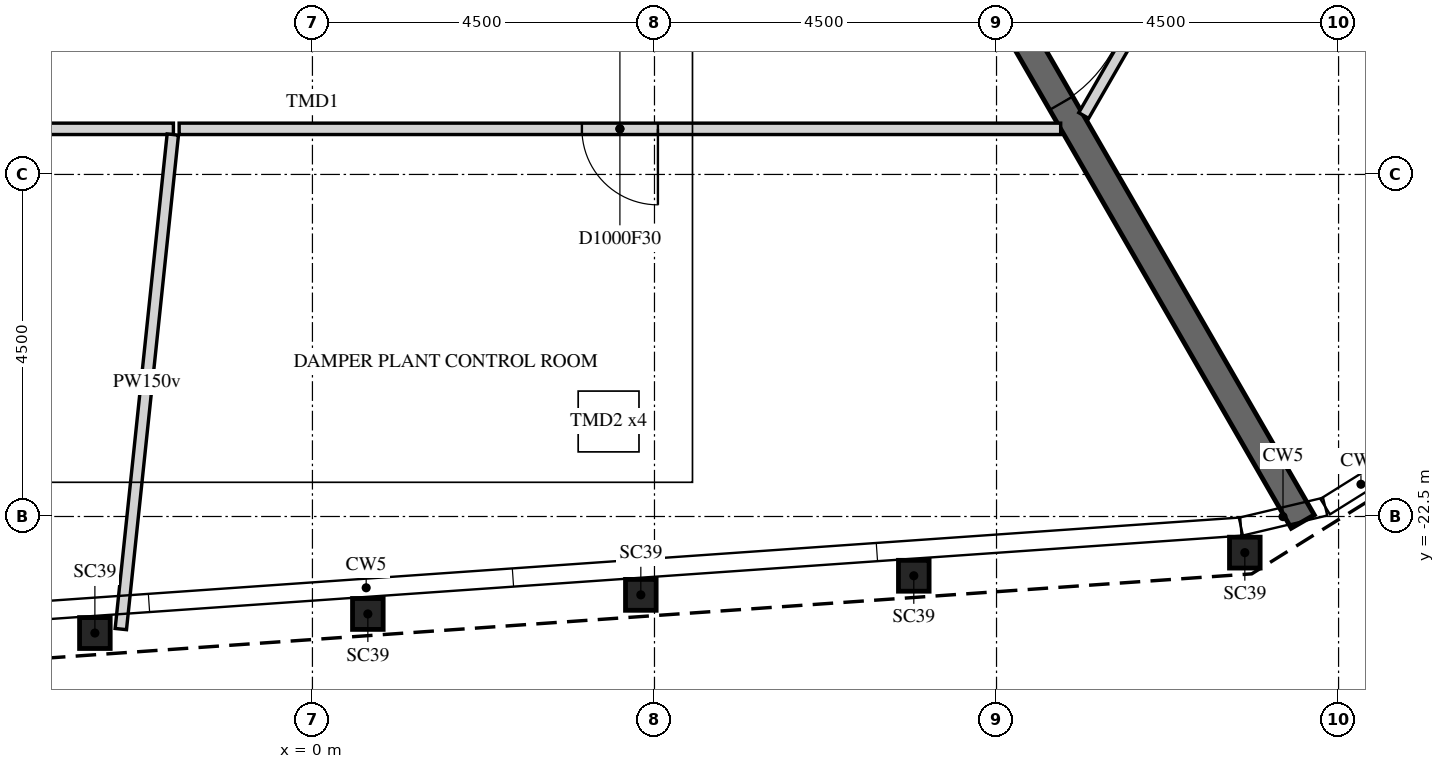
"""IFC4 building model, lengths in metres.
Left out: names, types, materials, properties, quantities, classifications, styles, units other than length and angle.
Written with IfcOpenShell. Run it as: python <this file> out.ifc"""

import sys

from ifc_helpers import new_model, si_unit, direction, frame, frame_2d, origin, origin_2d, place, context, subcontext, project, spatial, rectangle, i_section, extrude, element, fill, save


model = new_model("IFC4")
c1 = context("Model", 3, precision=1e-05, world=origin(), true_north=direction((0.0, 1.0)))
c2 = subcontext(c1, "Body", "Model", "MODEL_VIEW")
j1 = project(units=[si_unit("LENGTHUNIT", "METRE"), si_unit("PLANEANGLEUNIT", "RADIAN")], contexts=[c1])
p1 = place(None, origin())
s1 = spatial("IfcSite", under=j1, at=p1, CompositionType="ELEMENT")
p2 = place(p1, origin())
s2 = spatial("IfcBuilding", under=s1, at=p2, CompositionType="ELEMENT")
p3 = place(p2, frame((0.0, 0.0, 376.8)))
s3 = spatial("IfcBuildingStorey", under=s2, at=p3, CompositionType="ELEMENT", Elevation=376.8)
for number, where, z_axis, x_axis in (
    (1, (-2.862, -24.033, 0.0), (0.0, 0.0, 1.0), (1.0, 0.0, 0.0)),
    (2, (0.729, -23.782, 0.0), (0.0, 0.0, 1.0), (1.0, 0.0, 0.0)),
    (3, (4.32, -23.531, 0.0), (0.0, 0.0, 1.0), (1.0, 0.0, 0.0)),
    (4, (7.912, -23.28, 0.0), (0.0, 0.0, 1.0), (1.0, 0.0, 0.0)),
    (5, (12.267, -22.975, 0.0), (0.0, 0.0, 1.0), (1.0, 0.0, 0.0)),
):
    element("IfcColumn", number, at=place(p3, frame(where, z_axis=z_axis, x_axis=x_axis)), inside=s3, PredefinedType="COLUMN", context=c2, shape_type="SweptSolid", body=[
        extrude(i_section(OverallWidth=0.403, OverallDepth=0.406, WebThickness=0.027, FlangeThickness=0.043, FilletRadius=0.015, at=origin_2d()), origin(), (0.0, 0.0, 1.0), 11.2),
    ])
p4 = place(p3, frame((5.773, -10.0, -0.5), z_axis=(0.0, 0.0, 1.0), x_axis=(0.500007911273, -0.866020836161, 0.0)))
e6 = element("IfcWall", 6, at=p4, inside=s3, PredefinedType="SHEAR", context=c2, shape_type="SweptSolid", body=[
    extrude(rectangle(XDim=14.51, YDim=0.35, at=frame_2d((7.255, 0.0))), origin(), (0.0, 0.0, 1.0), 11.7),
])
p5 = place(p4, frame((6.355, 0.0, 0.5)))
e7 = element("IfcOpeningElement", 7, at=p5, cuts=e6, PredefinedType="OPENING", context=c2, shape_type="SweptSolid", body=[
    extrude(rectangle(XDim=1.8, YDim=2.4, at=frame_2d((0.9, 1.2))), frame((0.0, 0.185, 0.0), z_axis=(0.0, -1.0, 0.0), x_axis=(1.0, 0.0, 0.0)), (0.0, 0.0, 1.0), 0.37),
])
p6 = place(p3, frame((-9.959, -17.4, 0.0), z_axis=(0.0, 0.0, 1.0), x_axis=(1.0, 0.0, 0.0)))
e8 = element("IfcWall", 8, at=p6, inside=s3, PredefinedType="PARTITIONING", context=c2, shape_type="SweptSolid", body=[
    extrude(rectangle(XDim=8.13, YDim=0.15, at=frame_2d((4.065, 0.0))), origin(), (0.0, 0.0, 1.0), 11.2),
])
p7 = place(p3, frame((-2.521, -23.981, 0.0), z_axis=(0.0, 0.0, 1.0), x_axis=(0.10457210654, 0.994517307307, 0.0)))
e9 = element("IfcWall", 9, at=p7, inside=s3, PredefinedType="PARTITIONING", context=c2, shape_type="SweptSolid", body=[
    extrude(rectangle(XDim=6.542, YDim=0.15, at=frame_2d((3.271, 0.0))), origin(), (0.0, 0.0, 1.0), 10.522),
])
p8 = place(p3, frame((9.844, -17.4, 0.0), z_axis=(0.0, 0.0, 1.0), x_axis=(-1.0, 0.0, 0.0)))
e10 = element("IfcWall", 10, at=p8, inside=s3, PredefinedType="PARTITIONING", context=c2, shape_type="SweptSolid", body=[
    extrude(rectangle(XDim=11.598, YDim=0.15, at=frame_2d((5.799, 0.0))), origin(), (0.0, 0.0, 1.0), 11.2),
])
p9 = place(p8, frame((5.299, 0.0, 0.0)))
e11 = element("IfcOpeningElement", 11, at=p9, cuts=e10, PredefinedType="OPENING", context=c2, shape_type="SweptSolid", body=[
    extrude(rectangle(XDim=1.0, YDim=2.1, at=frame_2d((0.5, 1.05))), frame((0.0, 0.085, 0.0), z_axis=(0.0, -1.0, 0.0), x_axis=(1.0, 0.0, 0.0)), (0.0, 0.0, 1.0), 0.17),
])
p10 = place(p3, frame((20.092, 0.0, 0.0), z_axis=(0.0, 0.0, 1.0), x_axis=(-0.500005791521, -0.866022060022, 0.0)))
e12 = element("IfcWall", 12, at=p10, inside=s3, PredefinedType="PARTITIONING", context=c2, shape_type="SweptSolid", body=[
    extrude(rectangle(XDim=19.89, YDim=0.15, at=frame_2d((9.945, 0.0))), origin(), (0.0, 0.0, 1.0), 11.2),
])
p11 = place(p10, frame((9.045, 0.0, 0.0)))
e13 = element("IfcOpeningElement", 13, at=p11, cuts=e12, PredefinedType="OPENING", context=c2, shape_type="SweptSolid", body=[
    extrude(rectangle(XDim=1.8, YDim=2.1, at=frame_2d((0.9, 1.05))), frame((0.0, 0.085, 0.0), z_axis=(0.0, -1.0, 0.0), x_axis=(1.0, 0.0, 0.0)), (0.0, 0.0, 1.0), 0.17),
])
p12 = place(p5, origin())
e14 = element("IfcDoor", 14, at=p12, inside=s3, OperationType="DOUBLE_DOOR_SINGLE_SWING", PredefinedType="DOOR", context=c2, shape_type="SweptSolid", body=[
    extrude(rectangle(XDim=1.8, YDim=2.4, at=frame_2d((0.9, 1.2))), frame((0.0, 0.025, 0.0), z_axis=(0.0, -1.0, 0.0), x_axis=(1.0, 0.0, 0.0)), (0.0, 0.0, 1.0), 0.05),
])
fill(e7, e14)
p13 = place(p9, origin())
e15 = element("IfcDoor", 15, at=p13, inside=s3, OperationType="SINGLE_SWING_RIGHT", PredefinedType="DOOR", context=c2, shape_type="SweptSolid", body=[
    extrude(rectangle(XDim=1.0, YDim=2.1, at=frame_2d((0.5, 1.05))), frame((0.0, 0.025, 0.0), z_axis=(0.0, -1.0, 0.0), x_axis=(1.0, 0.0, 0.0)), (0.0, 0.0, 1.0), 0.05),
])
fill(e11, e15)
save(model, sys.argv[1])
